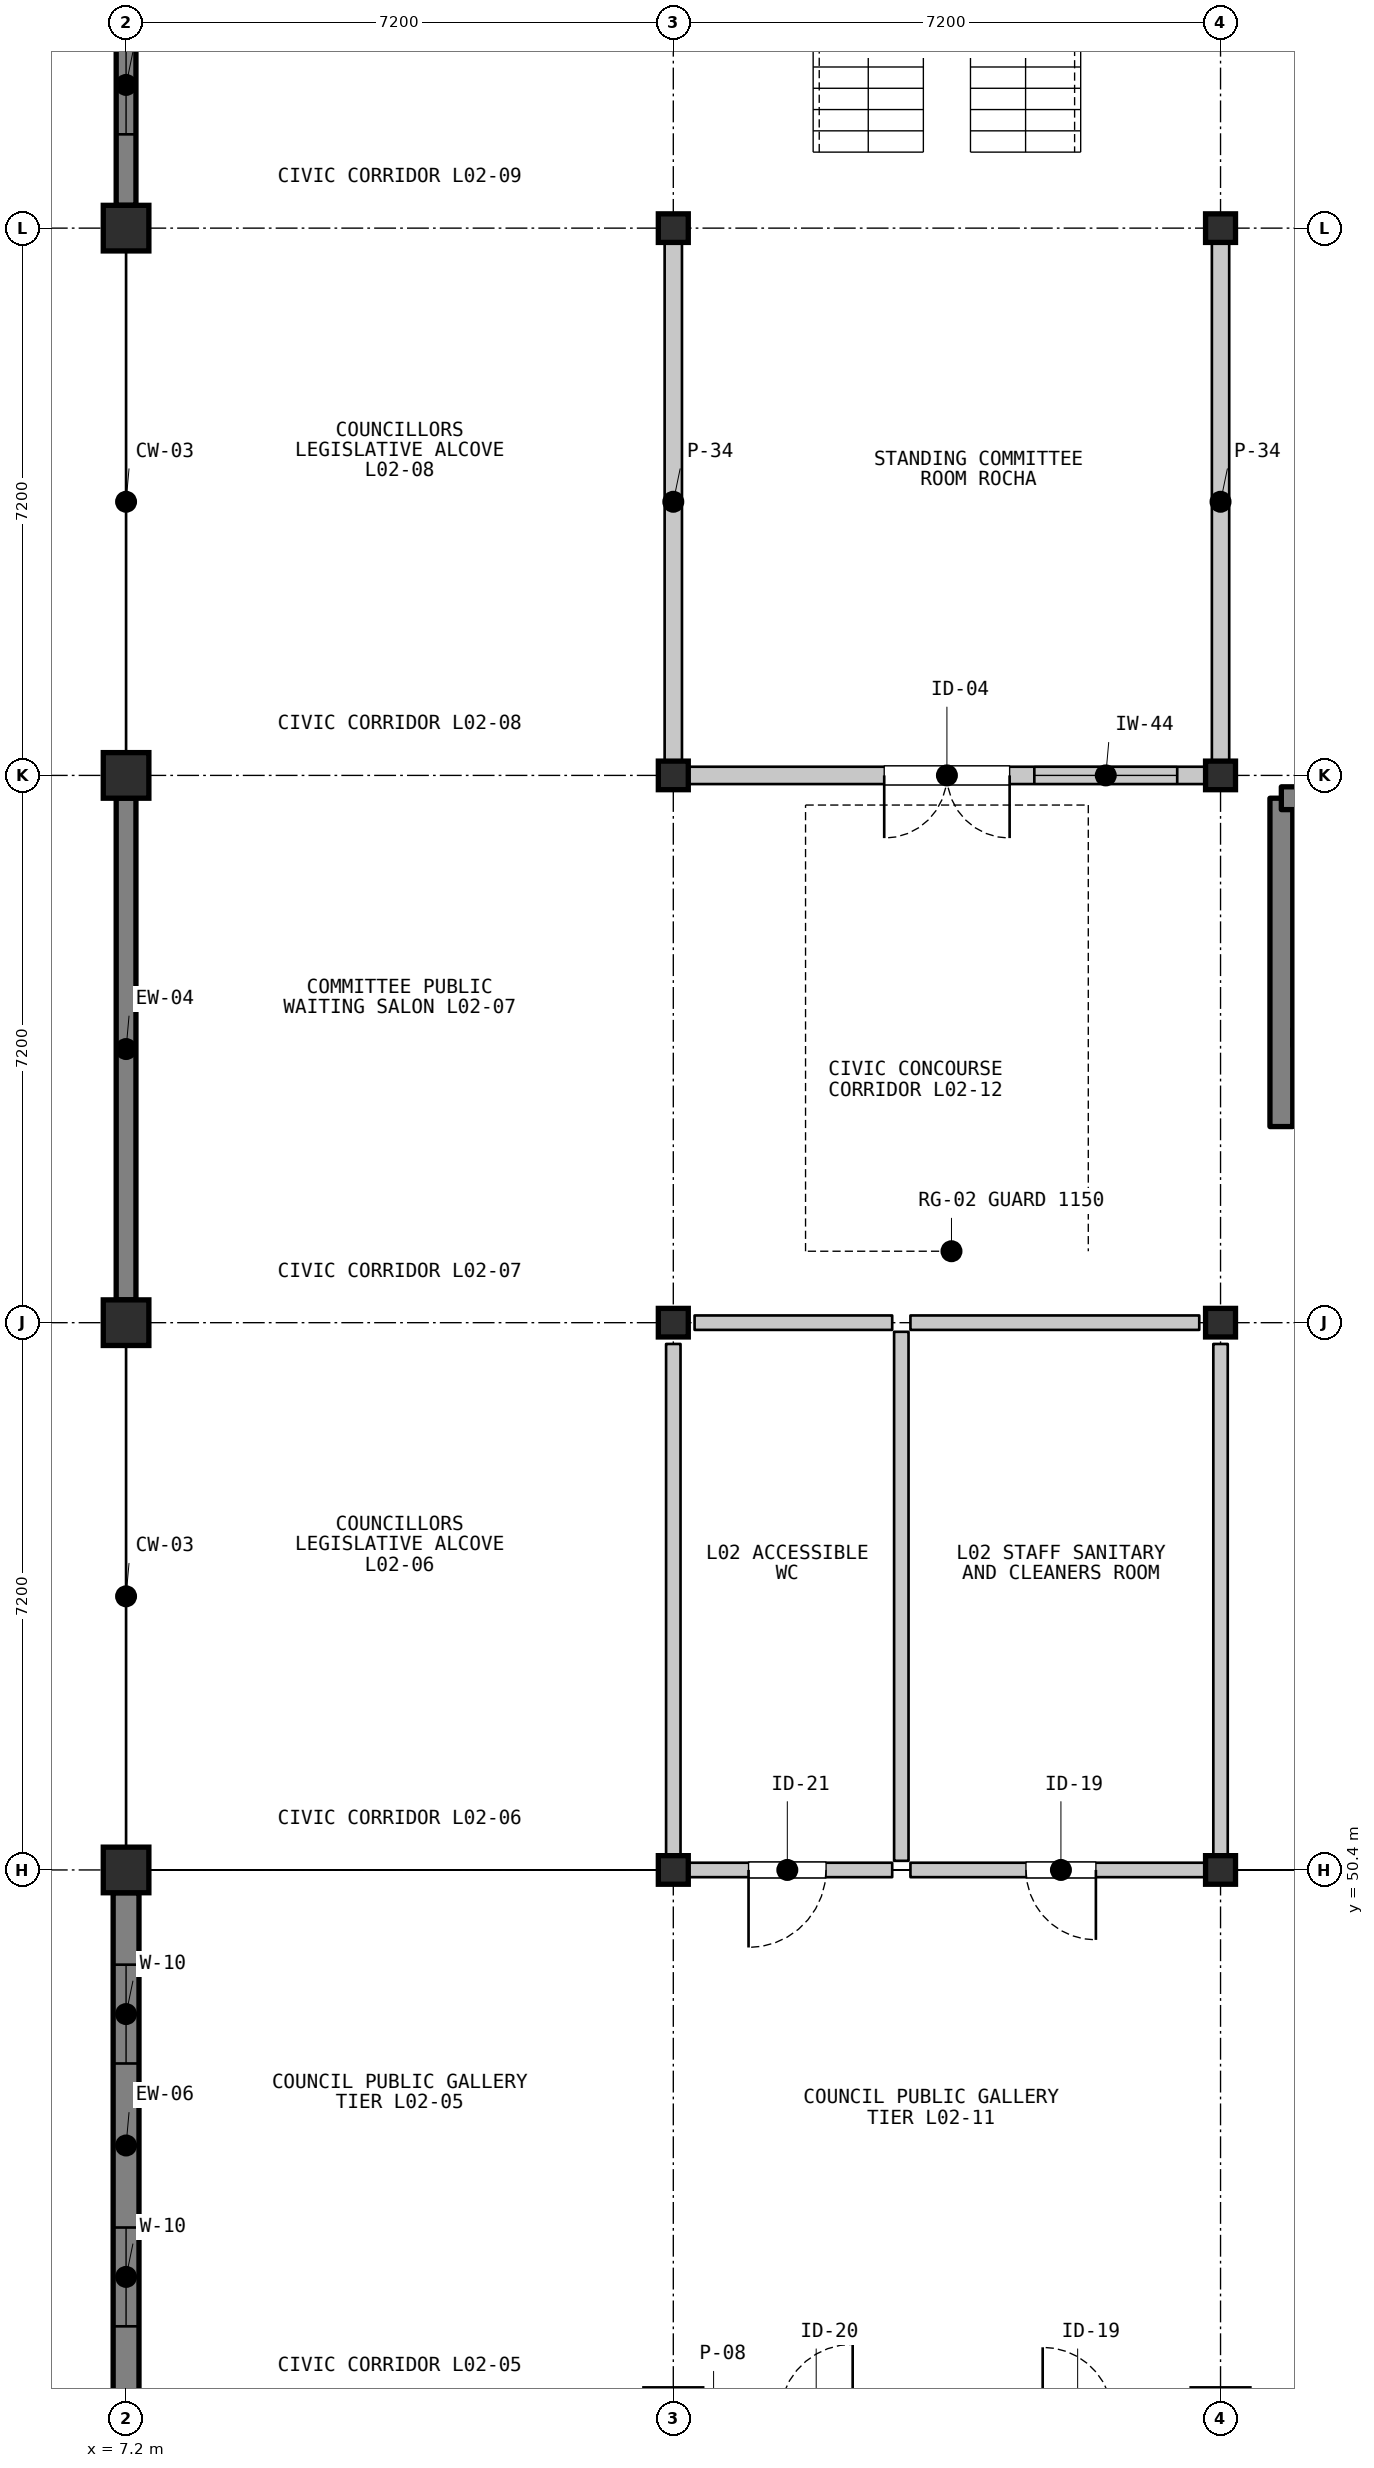
"""IFC4 building model, lengths in metres.
Left out: names, types, materials, properties, quantities, classifications, styles, units other than length and angle.
Written with IfcOpenShell. Run it as: python <this file> out.ifc"""

import sys

from ifc_helpers import new_model, si_unit, direction, frame, frame_2d, origin, origin_2d, place, context, subcontext, project, spatial, rectangle, i_section, extrude, element, fill, save


model = new_model("IFC4")
c1 = context("Model", 3, precision=1e-05, world=origin(), true_north=direction((0.0, 1.0)))
c2 = subcontext(c1, "Body", "Model", "MODEL_VIEW")
j1 = project(units=[si_unit("LENGTHUNIT", "METRE"), si_unit("PLANEANGLEUNIT", "RADIAN")], contexts=[c1])
p1 = place(None, origin())
s1 = spatial("IfcSite", under=j1, at=p1, CompositionType="ELEMENT")
p2 = place(p1, origin())
s2 = spatial("IfcBuilding", under=s1, at=p2, CompositionType="ELEMENT")
p3 = place(p2, frame((0.0, 0.0, 5.4)))
s3 = spatial("IfcBuildingStorey", under=s2, at=p3, CompositionType="ELEMENT", Elevation=5.4)
for number, where, z_axis, x_axis in (
    (1, (7.2, 50.4, 0.0), (0.0, 0.0, 1.0), (1.0, 0.0, 0.0)),
    (2, (7.2, 57.6, 0.0), (0.0, 0.0, 1.0), (1.0, 0.0, 0.0)),
    (3, (7.2, 64.8, 0.0), (0.0, 0.0, 1.0), (1.0, 0.0, 0.0)),
    (4, (7.2, 72.0, 0.0), (0.0, 0.0, 1.0), (1.0, 0.0, 0.0)),
):
    element("IfcColumn", number, at=place(p3, frame(where, z_axis=z_axis, x_axis=x_axis)), inside=s3, PredefinedType="COLUMN", context=c2, shape_type="SweptSolid", body=[
        extrude(rectangle(XDim=0.6, YDim=0.6, at=origin_2d()), origin(), (0.0, 0.0, 1.0), 4.5),
    ])
p4 = place(p3, frame((14.4, 43.2, 0.0), z_axis=(0.0, 0.0, 1.0), x_axis=(1.0, 0.0, 0.0)))
e5 = element("IfcColumn", 5, at=p4, inside=s3, PredefinedType="COLUMN", context=c2, shape_type="SweptSolid", body=[
    extrude(rectangle(XDim=0.75, YDim=0.75, at=origin_2d()), origin(), (0.0, 0.0, 1.0), 4.5),
])
for number, where, z_axis, x_axis in (
    (6, (14.4, 50.4, 0.0), (0.0, 0.0, 1.0), (1.0, 0.0, 0.0)),
    (7, (14.4, 57.6, 0.0), (0.0, 0.0, 1.0), (1.0, 0.0, 0.0)),
    (8, (14.4, 64.8, 0.0), (0.0, 0.0, 1.0), (1.0, 0.0, 0.0)),
    (9, (14.4, 72.0, 0.0), (0.0, 0.0, 1.0), (1.0, 0.0, 0.0)),
):
    element("IfcColumn", number, at=place(p3, frame(where, z_axis=z_axis, x_axis=x_axis)), inside=s3, PredefinedType="COLUMN", context=c2, shape_type="SweptSolid", body=[
        extrude(i_section(OverallWidth=0.394, OverallDepth=0.376, WebThickness=0.017, FlangeThickness=0.028, FilletRadius=0.015, at=origin_2d()), origin(), (0.0, 0.0, 1.0), 4.5),
    ])
p5 = place(p3, frame((21.6, 43.2, 0.0), z_axis=(0.0, 0.0, 1.0), x_axis=(1.0, 0.0, 0.0)))
e10 = element("IfcColumn", 10, at=p5, inside=s3, PredefinedType="COLUMN", context=c2, shape_type="SweptSolid", body=[
    extrude(rectangle(XDim=0.75, YDim=0.75, at=origin_2d()), origin(), (0.0, 0.0, 1.0), 4.5),
])
for number, where, z_axis, x_axis in (
    (11, (21.6, 50.4, 0.0), (0.0, 0.0, 1.0), (1.0, 0.0, 0.0)),
    (12, (21.6, 57.6, 0.0), (0.0, 0.0, 1.0), (1.0, 0.0, 0.0)),
    (13, (21.6, 64.8, 0.0), (0.0, 0.0, 1.0), (1.0, 0.0, 0.0)),
    (14, (21.6, 72.0, 0.0), (0.0, 0.0, 1.0), (1.0, 0.0, 0.0)),
):
    element("IfcColumn", number, at=place(p3, frame(where, z_axis=z_axis, x_axis=x_axis)), inside=s3, PredefinedType="COLUMN", context=c2, shape_type="SweptSolid", body=[
        extrude(i_section(OverallWidth=0.394, OverallDepth=0.376, WebThickness=0.017, FlangeThickness=0.028, FilletRadius=0.015, at=origin_2d()), origin(), (0.0, 0.0, 1.0), 4.5),
    ])
p6 = place(p3, frame((7.2, 43.45, 0.0), z_axis=(0.0, 0.0, 1.0), x_axis=(0.0, 1.0, 0.0)))
e15 = element("IfcWall", 15, at=p6, inside=s3, PredefinedType="SOLIDWALL", context=c2, shape_type="SweptSolid", body=[
    extrude(rectangle(XDim=6.65, YDim=0.34, at=frame_2d((3.325, 0.0))), origin(), (0.0, 0.0, 1.0), 3.767),
])
p7 = place(p6, frame((0.946, 0.0, 0.95)))
e16 = element("IfcOpeningElement", 16, at=p7, cuts=e15, PredefinedType="OPENING", context=c2, shape_type="SweptSolid", body=[
    extrude(rectangle(XDim=1.3, YDim=2.0, at=frame_2d((0.65, 1.0))), frame((0.0, 0.18, 0.0), z_axis=(0.0, -1.0, 0.0), x_axis=(1.0, 0.0, 0.0)), (0.0, 0.0, 1.0), 0.36),
])
p8 = place(p6, frame((4.404, 0.0, 0.95)))
e17 = element("IfcOpeningElement", 17, at=p8, cuts=e15, PredefinedType="OPENING", context=c2, shape_type="SweptSolid", body=[
    extrude(rectangle(XDim=1.3, YDim=2.0, at=frame_2d((0.65, 1.0))), frame((0.0, 0.18, 0.0), z_axis=(0.0, -1.0, 0.0), x_axis=(1.0, 0.0, 0.0)), (0.0, 0.0, 1.0), 0.36),
])
p9 = place(p3, frame((7.2, 57.9, 0.0), z_axis=(0.0, 0.0, 1.0), x_axis=(0.0, 1.0, 0.0)))
e18 = element("IfcWall", 18, at=p9, inside=s3, PredefinedType="SOLIDWALL", context=c2, shape_type="SweptSolid", body=[
    extrude(rectangle(XDim=6.6, YDim=0.26, at=frame_2d((3.3, 0.0))), origin(), (0.0, 0.0, 1.0), 3.767),
])
p10 = place(p3, frame((7.2, 72.3, 0.0), z_axis=(0.0, 0.0, 1.0), x_axis=(0.0, 1.0, 0.0)))
e19 = element("IfcWall", 19, at=p10, inside=s3, PredefinedType="SOLIDWALL", context=c2, shape_type="SweptSolid", body=[
    extrude(rectangle(XDim=6.6, YDim=0.26, at=frame_2d((3.3, 0.0))), origin(), (0.0, 0.0, 1.0), 3.767),
])
p11 = place(p10, frame((0.934, 0.0, 0.95)))
e20 = element("IfcOpeningElement", 20, at=p11, cuts=e19, PredefinedType="OPENING", context=c2, shape_type="SweptSolid", body=[
    extrude(rectangle(XDim=1.3, YDim=2.0, at=frame_2d((0.65, 1.0))), frame((0.0, 0.14, 0.0), z_axis=(0.0, -1.0, 0.0), x_axis=(1.0, 0.0, 0.0)), (0.0, 0.0, 1.0), 0.28),
])
p12 = place(p10, frame((4.366, 0.0, 0.95)))
e21 = element("IfcOpeningElement", 21, at=p12, cuts=e19, PredefinedType="OPENING", context=c2, shape_type="SweptSolid", body=[
    extrude(rectangle(XDim=1.3, YDim=2.0, at=frame_2d((0.65, 1.0))), frame((0.0, 0.14, 0.0), z_axis=(0.0, -1.0, 0.0), x_axis=(1.0, 0.0, 0.0)), (0.0, 0.0, 1.0), 0.28),
])
p13 = place(p3, frame((22.4, 60.18, 0.0), z_axis=(0.0, 0.0, 1.0), x_axis=(0.0, 1.0, 0.0)))
e22 = element("IfcWall", 22, at=p13, inside=s3, PredefinedType="SHEAR", context=c2, shape_type="SweptSolid", body=[
    extrude(rectangle(XDim=4.32, YDim=0.3, at=frame_2d((2.16, 0.0))), origin(), (0.0, 0.0, 1.0), 4.3),
])
p14 = place(p3, frame((22.4, 64.5, 0.0), z_axis=(0.0, 0.0, 1.0), x_axis=(1.0, 0.0, 0.0)))
e23 = element("IfcWall", 23, at=p14, inside=s3, PredefinedType="SHEAR", context=c2, shape_type="SweptSolid", body=[
    extrude(rectangle(XDim=5.92, YDim=0.3, at=frame_2d((2.96, 0.0))), origin(), (0.0, 0.0, 1.0), 4.3),
])
p15 = place(p3, frame((22.55, 61.35, 0.0), z_axis=(0.0, 0.0, 1.0), x_axis=(1.0, 0.0, 0.0)))
e24 = element("IfcWall", 24, at=p15, inside=s3, PredefinedType="SHEAR", context=c2, shape_type="SweptSolid", body=[
    extrude(rectangle(XDim=2.4, YDim=0.22, at=frame_2d((1.2, 0.0))), origin(), (0.0, 0.0, 1.0), 4.3),
])
p16 = place(p3, frame((17.28, 50.4, 0.0), z_axis=(0.0, 0.0, 1.0), x_axis=(-1.0, 0.0, 0.0)))
e25 = element("IfcWall", 25, at=p16, inside=s3, PredefinedType="PARTITIONING", context=c2, shape_type="SweptSolid", body=[
    extrude(rectangle(XDim=2.76, YDim=0.19, at=frame_2d((1.38, 0.0))), origin(), (0.0, 0.0, 1.0), 3.688),
])
p17 = place(p16, frame((0.87, 0.0, 0.0)))
e26 = element("IfcOpeningElement", 26, at=p17, cuts=e25, PredefinedType="OPENING", context=c2, shape_type="SweptSolid", body=[
    extrude(rectangle(XDim=1.02, YDim=2.15, at=frame_2d((0.51, 1.075))), frame((0.0, 0.105, 0.0), z_axis=(0.0, -1.0, 0.0), x_axis=(1.0, 0.0, 0.0)), (0.0, 0.0, 1.0), 0.21),
])
p18 = place(p3, frame((14.68, 57.6, 0.0), z_axis=(0.0, 0.0, 1.0), x_axis=(1.0, 0.0, 0.0)))
e27 = element("IfcWall", 27, at=p18, inside=s3, PredefinedType="PARTITIONING", context=c2, shape_type="SweptSolid", body=[
    extrude(rectangle(XDim=2.6, YDim=0.19, at=frame_2d((1.3, 0.0))), origin(), (0.0, 0.0, 1.0), 3.688),
])
p19 = place(p3, frame((14.4, 50.52, 0.0), z_axis=(0.0, 0.0, 1.0), x_axis=(0.0, 1.0, 0.0)))
e28 = element("IfcWall", 28, at=p19, inside=s3, PredefinedType="PARTITIONING", context=c2, shape_type="SweptSolid", body=[
    extrude(rectangle(XDim=6.8, YDim=0.19, at=frame_2d((3.4, 0.0))), origin(), (0.0, 0.0, 1.0), 3.688),
])
p20 = place(p3, frame((17.4, 57.48, 0.0), z_axis=(0.0, 0.0, 1.0), x_axis=(0.0, -1.0, 0.0)))
e29 = element("IfcWall", 29, at=p20, inside=s3, PredefinedType="PARTITIONING", context=c2, shape_type="SweptSolid", body=[
    extrude(rectangle(XDim=6.96, YDim=0.19, at=frame_2d((3.48, 0.0))), origin(), (0.0, 0.0, 1.0), 3.688),
])
p21 = place(p3, frame((21.48, 50.4, 0.0), z_axis=(0.0, 0.0, 1.0), x_axis=(-1.0, 0.0, 0.0)))
e30 = element("IfcWall", 30, at=p21, inside=s3, PredefinedType="PARTITIONING", context=c2, shape_type="SweptSolid", body=[
    extrude(rectangle(XDim=3.96, YDim=0.19, at=frame_2d((1.98, 0.0))), origin(), (0.0, 0.0, 1.0), 3.688),
])
p22 = place(p21, frame((1.52, 0.0, 0.0)))
e31 = element("IfcOpeningElement", 31, at=p22, cuts=e30, PredefinedType="OPENING", context=c2, shape_type="SweptSolid", body=[
    extrude(rectangle(XDim=0.92, YDim=2.1, at=frame_2d((0.46, 1.05))), frame((0.0, 0.105, 0.0), z_axis=(0.0, -1.0, 0.0), x_axis=(1.0, 0.0, 0.0)), (0.0, 0.0, 1.0), 0.21),
])
p23 = place(p3, frame((17.52, 57.6, 0.0), z_axis=(0.0, 0.0, 1.0), x_axis=(1.0, 0.0, 0.0)))
e32 = element("IfcWall", 32, at=p23, inside=s3, PredefinedType="PARTITIONING", context=c2, shape_type="SweptSolid", body=[
    extrude(rectangle(XDim=3.8, YDim=0.19, at=frame_2d((1.9, 0.0))), origin(), (0.0, 0.0, 1.0), 3.688),
])
p24 = place(p3, frame((21.6, 57.32, 0.0), z_axis=(0.0, 0.0, 1.0), x_axis=(0.0, -1.0, 0.0)))
e33 = element("IfcWall", 33, at=p24, inside=s3, PredefinedType="PARTITIONING", context=c2, shape_type="SweptSolid", body=[
    extrude(rectangle(XDim=6.8, YDim=0.19, at=frame_2d((3.4, 0.0))), origin(), (0.0, 0.0, 1.0), 3.688),
])
p25 = place(p3, frame((14.4, 64.92, 0.0), z_axis=(0.0, 0.0, 1.0), x_axis=(0.0, 1.0, 0.0)))
e34 = element("IfcWall", 34, at=p25, inside=s3, PredefinedType="PARTITIONING", context=c2, shape_type="SweptSolid", body=[
    extrude(rectangle(XDim=6.96, YDim=0.228, at=frame_2d((3.48, 0.0))), origin(), (0.0, 0.0, 1.0), 3.688),
])
p26 = place(p3, frame((21.48, 64.8, 0.0), z_axis=(0.0, 0.0, 1.0), x_axis=(-1.0, 0.0, 0.0)))
e35 = element("IfcWall", 35, at=p26, inside=s3, PredefinedType="PARTITIONING", context=c2, shape_type="SweptSolid", body=[
    extrude(rectangle(XDim=6.96, YDim=0.228, at=frame_2d((3.48, 0.0))), origin(), (0.0, 0.0, 1.0), 3.688),
])
p27 = place(p26, frame((2.655, 0.0, 0.0)))
e36 = element("IfcOpeningElement", 36, at=p27, cuts=e35, PredefinedType="OPENING", context=c2, shape_type="SweptSolid", body=[
    extrude(rectangle(XDim=1.65, YDim=2.35, at=frame_2d((0.825, 1.175))), frame((0.0, 0.124, 0.0), z_axis=(0.0, -1.0, 0.0), x_axis=(1.0, 0.0, 0.0)), (0.0, 0.0, 1.0), 0.248),
])
p28 = place(p26, frame((0.45, 0.0, 1.05)))
e37 = element("IfcOpeningElement", 37, at=p28, cuts=e35, PredefinedType="OPENING", context=c2, shape_type="SweptSolid", body=[
    extrude(rectangle(XDim=1.88, YDim=1.38, at=frame_2d((0.94, 0.69))), frame((0.0, 0.124, 0.0), z_axis=(0.0, -1.0, 0.0), x_axis=(1.0, 0.0, 0.0)), (0.0, 0.0, 1.0), 0.248),
])
p29 = place(p3, frame((21.6, 71.88, 0.0), z_axis=(0.0, 0.0, 1.0), x_axis=(0.0, -1.0, 0.0)))
e38 = element("IfcWall", 38, at=p29, inside=s3, PredefinedType="PARTITIONING", context=c2, shape_type="SweptSolid", body=[
    extrude(rectangle(XDim=6.96, YDim=0.228, at=frame_2d((3.48, 0.0))), origin(), (0.0, 0.0, 1.0), 3.688),
])
p30 = place(p7, origin())
e39 = element("IfcWindow", 39, at=p30, inside=s3, PartitioningType="SINGLE_PANEL", PredefinedType="WINDOW", context=c2, shape_type="SweptSolid", body=[
    extrude(rectangle(XDim=1.3, YDim=2.0, at=frame_2d((0.65, 1.0))), frame((0.0, 0.03, 0.0), z_axis=(0.0, -1.0, 0.0), x_axis=(1.0, 0.0, 0.0)), (0.0, 0.0, 1.0), 0.06),
])
fill(e16, e39)
p31 = place(p8, origin())
e40 = element("IfcWindow", 40, at=p31, inside=s3, PartitioningType="SINGLE_PANEL", PredefinedType="WINDOW", context=c2, shape_type="SweptSolid", body=[
    extrude(rectangle(XDim=1.3, YDim=2.0, at=frame_2d((0.65, 1.0))), frame((0.0, 0.03, 0.0), z_axis=(0.0, -1.0, 0.0), x_axis=(1.0, 0.0, 0.0)), (0.0, 0.0, 1.0), 0.06),
])
fill(e17, e40)
p32 = place(p11, origin())
e41 = element("IfcWindow", 41, at=p32, inside=s3, PartitioningType="SINGLE_PANEL", PredefinedType="WINDOW", context=c2, shape_type="SweptSolid", body=[
    extrude(rectangle(XDim=1.3, YDim=2.0, at=frame_2d((0.65, 1.0))), frame((0.0, 0.03, 0.0), z_axis=(0.0, -1.0, 0.0), x_axis=(1.0, 0.0, 0.0)), (0.0, 0.0, 1.0), 0.06),
])
fill(e20, e41)
p33 = place(p17, origin())
e42 = element("IfcDoor", 42, at=p33, inside=s3, OperationType="SINGLE_SWING_RIGHT", PredefinedType="DOOR", context=c2, shape_type="SweptSolid", body=[
    extrude(rectangle(XDim=1.02, YDim=2.15, at=frame_2d((0.51, 1.075))), frame((0.0, 0.025, 0.0), z_axis=(0.0, -1.0, 0.0), x_axis=(1.0, 0.0, 0.0)), (0.0, 0.0, 1.0), 0.05),
])
fill(e26, e42)
p34 = place(p22, origin())
e43 = element("IfcDoor", 43, at=p34, inside=s3, OperationType="SINGLE_SWING_LEFT", PredefinedType="DOOR", context=c2, shape_type="SweptSolid", body=[
    extrude(rectangle(XDim=0.92, YDim=2.1, at=frame_2d((0.46, 1.05))), frame((0.0, 0.025, 0.0), z_axis=(0.0, -1.0, 0.0), x_axis=(1.0, 0.0, 0.0)), (0.0, 0.0, 1.0), 0.05),
])
fill(e31, e43)
p35 = place(p27, origin())
e44 = element("IfcDoor", 44, at=p35, inside=s3, OperationType="DOUBLE_DOOR_SINGLE_SWING", PredefinedType="DOOR", context=c2, shape_type="SweptSolid", body=[
    extrude(rectangle(XDim=1.65, YDim=2.35, at=frame_2d((0.825, 1.175))), frame((0.0, 0.025, 0.0), z_axis=(0.0, -1.0, 0.0), x_axis=(1.0, 0.0, 0.0)), (0.0, 0.0, 1.0), 0.05),
])
fill(e36, e44)
p36 = place(p28, origin())
e45 = element("IfcWindow", 45, at=p36, inside=s3, PartitioningType="SINGLE_PANEL", PredefinedType="WINDOW", context=c2, shape_type="SweptSolid", body=[
    extrude(rectangle(XDim=1.88, YDim=1.38, at=frame_2d((0.94, 0.69))), frame((0.0, 0.03, 0.0), z_axis=(0.0, -1.0, 0.0), x_axis=(1.0, 0.0, 0.0)), (0.0, 0.0, 1.0), 0.06),
])
fill(e37, e45)
save(model, sys.argv[1])
